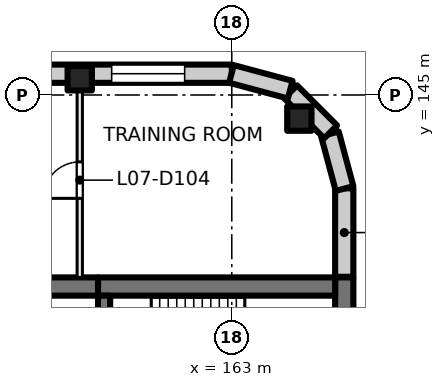
"""IFC4 building model, lengths in metres.
Left out: names, types, materials, properties, quantities, classifications, styles, units other than length and angle.
Written with IfcOpenShell. Run it as: python <this file> out.ifc"""

import sys

from ifc_helpers import new_model, si_unit, direction, frame, frame_2d, origin, origin_2d, place, context, subcontext, project, spatial, rectangle, extrude, element, fill, save


model = new_model("IFC4")
c1 = context("Model", 3, precision=1e-05, world=origin(), true_north=direction((0.0, 1.0)))
c2 = subcontext(c1, "Body", "Model", "MODEL_VIEW")
j1 = project(units=[si_unit("LENGTHUNIT", "METRE"), si_unit("PLANEANGLEUNIT", "RADIAN")], contexts=[c1])
p1 = place(None, origin())
s1 = spatial("IfcSite", under=j1, at=p1, CompositionType="ELEMENT")
p2 = place(p1, origin())
s2 = spatial("IfcBuilding", under=s1, at=p2, CompositionType="ELEMENT")
p3 = place(p2, frame((0.0, 0.0, 35.5)))
s3 = spatial("IfcBuildingStorey", under=s2, at=p3, CompositionType="ELEMENT", Elevation=35.5)
for number, where, z_axis, x_axis in (
    (1, (165.223, 144.223, 0.0), (0.0, 0.0, 1.0), (1.0, 0.0, 0.0)),
    (2, (158.0, 145.55, 0.0), (0.0, 0.0, 1.0), (1.0, 0.0, 0.0)),
):
    element("IfcColumn", number, at=place(p3, frame(where, z_axis=z_axis, x_axis=x_axis)), inside=s3, PredefinedType="COLUMN", context=c2, shape_type="SweptSolid", body=[
        extrude(rectangle(XDim=0.8, YDim=0.8, at=origin_2d()), origin(), (0.0, 0.0, 1.0), 4.0),
    ])
p4 = place(p3, frame((166.7, 139.0, 0.0), z_axis=(0.0, 0.0, 1.0), x_axis=(0.0, -1.0, 0.0)))
e3 = element("IfcWall", 3, at=p4, inside=s3, PredefinedType="SHEAR", context=c2, shape_type="SweptSolid", body=[
    extrude(rectangle(XDim=3.8, YDim=0.6, at=frame_2d((1.9, 0.0))), origin(), (0.0, 0.0, 1.0), 4.0),
])
p5 = place(p3, frame((166.4, 138.7, 0.0), z_axis=(0.0, 0.0, 1.0), x_axis=(-1.0, 0.0, 0.0)))
e4 = element("IfcWall", 4, at=p5, inside=s3, PredefinedType="SHEAR", context=c2, shape_type="SweptSolid", body=[
    extrude(rectangle(XDim=7.8, YDim=0.6, at=frame_2d((3.9, 0.0))), origin(), (0.0, 0.0, 1.0), 4.0),
])
p6 = place(p3, frame((158.6, 138.7, 0.0), z_axis=(0.0, 0.0, 1.0), x_axis=(-1.0, 0.0, 0.0)))
e5 = element("IfcWall", 5, at=p6, inside=s3, PredefinedType="SHEAR", context=c2, shape_type="SweptSolid", body=[
    extrude(rectangle(XDim=4.6, YDim=0.6, at=frame_2d((2.3, 0.0))), origin(), (0.0, 0.0, 1.0), 4.0),
])
p7 = place(p3, frame((158.8, 138.4, 0.0), z_axis=(0.0, 0.0, 1.0), x_axis=(0.0, -1.0, 0.0)))
e6 = element("IfcWall", 6, at=p7, inside=s3, PredefinedType="SHEAR", context=c2, shape_type="SweptSolid", body=[
    extrude(rectangle(XDim=2.8, YDim=0.4, at=frame_2d((1.4, 0.0))), origin(), (0.0, 0.0, 1.0), 4.0),
])
p8 = place(p7, frame((0.9, 0.0, 0.0)))
e7 = element("IfcOpeningElement", 7, at=p8, cuts=e6, PredefinedType="OPENING", context=c2, shape_type="SweptSolid", body=[
    extrude(rectangle(XDim=1.0, YDim=2.1, at=frame_2d((0.5, 1.05))), frame((0.0, 0.21, 0.0), z_axis=(0.0, -1.0, 0.0), x_axis=(1.0, 0.0, 0.0)), (0.0, 0.0, 1.0), 0.42),
])
p9 = place(p3, frame((131.07, 145.7, 0.0), z_axis=(0.0, 0.0, 1.0), x_axis=(1.0, 0.0, 0.0)))
e8 = element("IfcWall", 8, at=p9, inside=s3, PredefinedType="SOLIDWALL", context=c2, shape_type="SweptSolid", body=[
    extrude(rectangle(XDim=31.93, YDim=0.6, at=frame_2d((15.965, 0.0))), origin(), (0.0, 0.0, 1.0), 3.625),
])
p10 = place(p9, frame((0.98, 0.0, 0.9)))
e9 = element("IfcOpeningElement", 9, at=p10, cuts=e8, PredefinedType="OPENING", context=c2, shape_type="SweptSolid", body=[
    extrude(rectangle(XDim=2.4, YDim=2.4, at=frame_2d((1.2, 1.2))), frame((0.0, 0.31, 0.0), z_axis=(0.0, -1.0, 0.0), x_axis=(1.0, 0.0, 0.0)), (0.0, 0.0, 1.0), 0.62),
])
p11 = place(p9, frame((5.48, 0.0, 0.9)))
e10 = element("IfcOpeningElement", 10, at=p11, cuts=e8, PredefinedType="OPENING", context=c2, shape_type="SweptSolid", body=[
    extrude(rectangle(XDim=2.4, YDim=2.4, at=frame_2d((1.2, 1.2))), frame((0.0, 0.31, 0.0), z_axis=(0.0, -1.0, 0.0), x_axis=(1.0, 0.0, 0.0)), (0.0, 0.0, 1.0), 0.62),
])
p12 = place(p9, frame((9.98, 0.0, 0.9)))
e11 = element("IfcOpeningElement", 11, at=p12, cuts=e8, PredefinedType="OPENING", context=c2, shape_type="SweptSolid", body=[
    extrude(rectangle(XDim=2.4, YDim=2.4, at=frame_2d((1.2, 1.2))), frame((0.0, 0.31, 0.0), z_axis=(0.0, -1.0, 0.0), x_axis=(1.0, 0.0, 0.0)), (0.0, 0.0, 1.0), 0.62),
])
p13 = place(p9, frame((14.48, 0.0, 0.9)))
e12 = element("IfcOpeningElement", 12, at=p13, cuts=e8, PredefinedType="OPENING", context=c2, shape_type="SweptSolid", body=[
    extrude(rectangle(XDim=2.4, YDim=2.4, at=frame_2d((1.2, 1.2))), frame((0.0, 0.31, 0.0), z_axis=(0.0, -1.0, 0.0), x_axis=(1.0, 0.0, 0.0)), (0.0, 0.0, 1.0), 0.62),
])
p14 = place(p9, frame((18.98, 0.0, 0.9)))
e13 = element("IfcOpeningElement", 13, at=p14, cuts=e8, PredefinedType="OPENING", context=c2, shape_type="SweptSolid", body=[
    extrude(rectangle(XDim=2.4, YDim=2.4, at=frame_2d((1.2, 1.2))), frame((0.0, 0.31, 0.0), z_axis=(0.0, -1.0, 0.0), x_axis=(1.0, 0.0, 0.0)), (0.0, 0.0, 1.0), 0.62),
])
p15 = place(p9, frame((23.48, 0.0, 0.9)))
e14 = element("IfcOpeningElement", 14, at=p15, cuts=e8, PredefinedType="OPENING", context=c2, shape_type="SweptSolid", body=[
    extrude(rectangle(XDim=2.4, YDim=2.4, at=frame_2d((1.2, 1.2))), frame((0.0, 0.31, 0.0), z_axis=(0.0, -1.0, 0.0), x_axis=(1.0, 0.0, 0.0)), (0.0, 0.0, 1.0), 0.62),
])
p16 = place(p9, frame((27.98, 0.0, 0.9)))
e15 = element("IfcOpeningElement", 15, at=p16, cuts=e8, PredefinedType="OPENING", context=c2, shape_type="SweptSolid", body=[
    extrude(rectangle(XDim=2.4, YDim=2.4, at=frame_2d((1.2, 1.2))), frame((0.0, 0.31, 0.0), z_axis=(0.0, -1.0, 0.0), x_axis=(1.0, 0.0, 0.0)), (0.0, 0.0, 1.0), 0.62),
])
p17 = place(p3, frame((166.7, 141.93, 0.0), z_axis=(0.0, 0.0, 1.0), x_axis=(0.0, -1.0, 0.0)))
e16 = element("IfcWall", 16, at=p17, inside=s3, PredefinedType="SOLIDWALL", context=c2, shape_type="SweptSolid", body=[
    extrude(rectangle(XDim=2.91, YDim=0.6, at=frame_2d((1.455, 0.0))), origin(), (0.0, 0.0, 1.0), 3.625),
])
for number, where, z_axis, x_axis in (
    (17, (166.229, 143.719, 0.0), (0.0, 0.0, 1.0), (0.259, -0.966, 0.0)),
    (18, (164.936, 145.104, 0.0), (0.0, 0.0, 1.0), (0.707, -0.707, 0.0)),
):
    element("IfcWall", number, at=place(p3, frame(where, z_axis=z_axis, x_axis=x_axis)), inside=s3, PredefinedType="SOLIDWALL", context=c2, shape_type="SweptSolid", body=[
        extrude(rectangle(XDim=1.861, YDim=0.6, at=frame_2d((0.93, 0.0))), origin(), (0.0, 0.0, 1.0), 3.625),
    ])
p18 = place(p3, frame((162.99, 145.692, 0.0), z_axis=(0.0, 0.0, 1.0), x_axis=(0.965920269068, -0.258839784042, 0.0)))
e19 = element("IfcWall", 19, at=p18, inside=s3, PredefinedType="SOLIDWALL", context=c2, shape_type="SweptSolid", body=[
    extrude(rectangle(XDim=2.0, YDim=0.6, at=frame_2d((1.0, 0.0))), origin(), (0.0, 0.0, 1.0), 3.625),
])
p19 = place(p3, frame((158.0, 139.0, 0.0), z_axis=(0.0, 0.0, 1.0), x_axis=(0.0, 1.0, 0.0)))
e20 = element("IfcWall", 20, at=p19, inside=s3, PredefinedType="PARTITIONING", context=c2, shape_type="SweptSolid", body=[
    extrude(rectangle(XDim=6.4, YDim=0.175, at=frame_2d((3.2, 0.0))), origin(), (0.0, 0.0, 1.0), 3.625),
])
p20 = place(p19, frame((2.6, 0.0, 0.0)))
e21 = element("IfcOpeningElement", 21, at=p20, cuts=e20, PredefinedType="OPENING", context=c2, shape_type="SweptSolid", body=[
    extrude(rectangle(XDim=1.2, YDim=2.1, at=frame_2d((0.6, 1.05))), frame((0.0, 0.097, 0.0), z_axis=(0.0, -1.0, 0.0), x_axis=(1.0, 0.0, 0.0)), (0.0, 0.0, 1.0), 0.195),
])
p21 = place(p16, origin())
e22 = element("IfcWindow", 22, at=p21, inside=s3, PartitioningType="SINGLE_PANEL", PredefinedType="WINDOW", context=c2, shape_type="SweptSolid", body=[
    extrude(rectangle(XDim=2.4, YDim=2.4, at=frame_2d((1.2, 1.2))), frame((0.0, 0.03, 0.0), z_axis=(0.0, -1.0, 0.0), x_axis=(1.0, 0.0, 0.0)), (0.0, 0.0, 1.0), 0.06),
])
fill(e15, e22)
p22 = place(p20, origin())
e23 = element("IfcDoor", 23, at=p22, inside=s3, OperationType="DOUBLE_DOOR_SINGLE_SWING", PredefinedType="DOOR", context=c2, shape_type="SweptSolid", body=[
    extrude(rectangle(XDim=1.2, YDim=2.1, at=frame_2d((0.6, 1.05))), frame((0.0, 0.025, 0.0), z_axis=(0.0, -1.0, 0.0), x_axis=(1.0, 0.0, 0.0)), (0.0, 0.0, 1.0), 0.05),
])
fill(e21, e23)
save(model, sys.argv[1])
